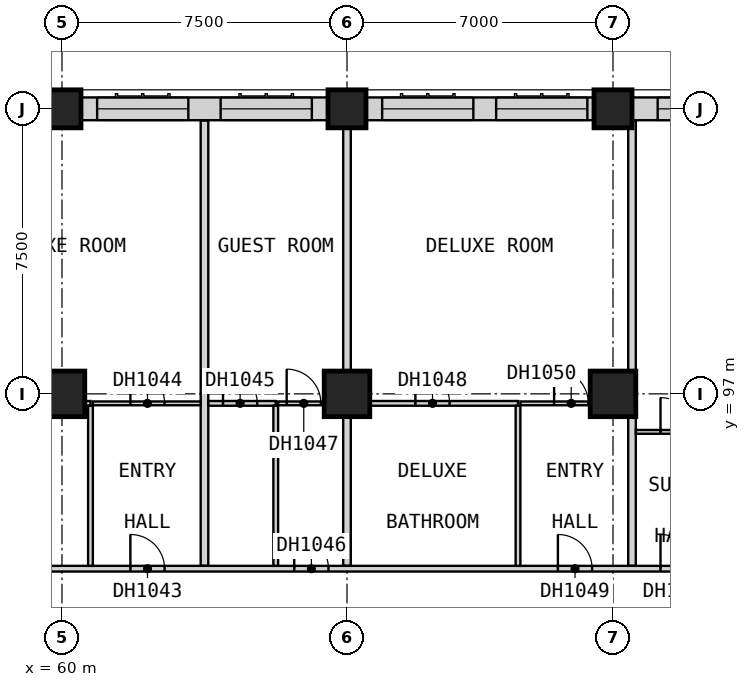
"""IFC4 building model, lengths in metres.
Left out: names, types, materials, properties, quantities, classifications, styles, units other than length and angle.
Written with IfcOpenShell. Run it as: python <this file> out.ifc"""

import sys

from ifc_helpers import new_model, si_unit, direction, frame, frame_2d, origin, origin_2d, place, context, subcontext, project, spatial, rectangle, extrude, element, fill, save


model = new_model("IFC4")
c1 = context("Model", 3, precision=1e-05, world=origin(), true_north=direction((0.0, 1.0)))
c2 = subcontext(c1, "Body", "Model", "MODEL_VIEW")
j1 = project(units=[si_unit("LENGTHUNIT", "METRE"), si_unit("PLANEANGLEUNIT", "RADIAN")], contexts=[c1])
p1 = place(None, origin())
s1 = spatial("IfcSite", under=j1, at=p1, CompositionType="ELEMENT")
p2 = place(p1, origin())
s2 = spatial("IfcBuilding", under=s1, at=p2, CompositionType="ELEMENT")
p3 = place(p2, frame((0.0, 0.0, 48.4)))
s3 = spatial("IfcBuildingStorey", under=s2, at=p3, CompositionType="ELEMENT", Elevation=48.4)
p4 = place(p3, frame((60.0, 97.0, 0.0), z_axis=(0.0, 0.0, 1.0), x_axis=(1.0, 0.0, 0.0)))
e1 = element("IfcColumn", 1, at=p4, inside=s3, PredefinedType="COLUMN", context=c2, shape_type="SweptSolid", body=[
    extrude(rectangle(XDim=1.2, YDim=1.2, at=origin_2d()), origin(), (0.0, 0.0, 1.0), 3.6),
])
p5 = place(p3, frame((60.0, 104.5, 0.0), z_axis=(0.0, 0.0, 1.0), x_axis=(1.0, 0.0, 0.0)))
e2 = element("IfcColumn", 2, at=p5, inside=s3, PredefinedType="COLUMN", context=c2, shape_type="SweptSolid", body=[
    extrude(rectangle(XDim=1.0, YDim=1.0, at=origin_2d()), origin(), (0.0, 0.0, 1.0), 3.6),
])
p6 = place(p3, frame((67.5, 97.0, 0.0), z_axis=(0.0, 0.0, 1.0), x_axis=(1.0, 0.0, 0.0)))
e3 = element("IfcColumn", 3, at=p6, inside=s3, PredefinedType="COLUMN", context=c2, shape_type="SweptSolid", body=[
    extrude(rectangle(XDim=1.2, YDim=1.2, at=origin_2d()), origin(), (0.0, 0.0, 1.0), 3.6),
])
p7 = place(p3, frame((67.5, 104.5, 0.0), z_axis=(0.0, 0.0, 1.0), x_axis=(1.0, 0.0, 0.0)))
e4 = element("IfcColumn", 4, at=p7, inside=s3, PredefinedType="COLUMN", context=c2, shape_type="SweptSolid", body=[
    extrude(rectangle(XDim=1.0, YDim=1.0, at=origin_2d()), origin(), (0.0, 0.0, 1.0), 3.6),
])
p8 = place(p3, frame((74.5, 97.0, 0.0), z_axis=(0.0, 0.0, 1.0), x_axis=(1.0, 0.0, 0.0)))
e5 = element("IfcColumn", 5, at=p8, inside=s3, PredefinedType="COLUMN", context=c2, shape_type="SweptSolid", body=[
    extrude(rectangle(XDim=1.2, YDim=1.2, at=origin_2d()), origin(), (0.0, 0.0, 1.0), 3.6),
])
p9 = place(p3, frame((74.5, 104.5, 0.0), z_axis=(0.0, 0.0, 1.0), x_axis=(1.0, 0.0, 0.0)))
e6 = element("IfcColumn", 6, at=p9, inside=s3, PredefinedType="COLUMN", context=c2, shape_type="SweptSolid", body=[
    extrude(rectangle(XDim=1.0, YDim=1.0, at=origin_2d()), origin(), (0.0, 0.0, 1.0), 3.6),
])
p10 = place(p3, frame((81.5, 104.5, 0.0), z_axis=(0.0, 0.0, 1.0), x_axis=(-1.0, 0.0, 0.0)))
e7 = element("IfcWall", 7, at=p10, inside=s3, PredefinedType="SOLIDWALL", context=c2, shape_type="SweptSolid", body=[
    extrude(rectangle(XDim=6.5, YDim=0.6, at=frame_2d((3.25, 0.0))), origin(), (0.0, 0.0, 1.0), 2.85),
])
p11 = place(p10, frame((3.425, 0.0, 0.8)))
e8 = element("IfcOpeningElement", 8, at=p11, cuts=e7, PredefinedType="OPENING", context=c2, shape_type="SweptSolid", body=[
    extrude(rectangle(XDim=2.4, YDim=1.8, at=frame_2d((1.2, 0.9))), frame((0.0, 0.31, 0.0), z_axis=(0.0, -1.0, 0.0), x_axis=(1.0, 0.0, 0.0)), (0.0, 0.0, 1.0), 0.62),
])
p12 = place(p10, frame((0.175, 0.0, 0.8)))
e9 = element("IfcOpeningElement", 9, at=p12, cuts=e7, PredefinedType="OPENING", context=c2, shape_type="SweptSolid", body=[
    extrude(rectangle(XDim=2.4, YDim=1.8, at=frame_2d((1.2, 0.9))), frame((0.0, 0.31, 0.0), z_axis=(0.0, -1.0, 0.0), x_axis=(1.0, 0.0, 0.0)), (0.0, 0.0, 1.0), 0.62),
])
p13 = place(p3, frame((74.0, 104.5, 0.0), z_axis=(0.0, 0.0, 1.0), x_axis=(-1.0, 0.0, 0.0)))
e10 = element("IfcWall", 10, at=p13, inside=s3, PredefinedType="SOLIDWALL", context=c2, shape_type="SweptSolid", body=[
    extrude(rectangle(XDim=6.0, YDim=0.6, at=frame_2d((3.0, 0.0))), origin(), (0.0, 0.0, 1.0), 2.85),
])
p14 = place(p13, frame((3.175, 0.0, 0.8)))
e11 = element("IfcOpeningElement", 11, at=p14, cuts=e10, PredefinedType="OPENING", context=c2, shape_type="SweptSolid", body=[
    extrude(rectangle(XDim=2.4, YDim=1.8, at=frame_2d((1.2, 0.9))), frame((0.0, 0.31, 0.0), z_axis=(0.0, -1.0, 0.0), x_axis=(1.0, 0.0, 0.0)), (0.0, 0.0, 1.0), 0.62),
])
p15 = place(p13, frame((0.175, 0.0, 0.8)))
e12 = element("IfcOpeningElement", 12, at=p15, cuts=e10, PredefinedType="OPENING", context=c2, shape_type="SweptSolid", body=[
    extrude(rectangle(XDim=2.4, YDim=1.8, at=frame_2d((1.2, 0.9))), frame((0.0, 0.31, 0.0), z_axis=(0.0, -1.0, 0.0), x_axis=(1.0, 0.0, 0.0)), (0.0, 0.0, 1.0), 0.62),
])
p16 = place(p3, frame((67.0, 104.5, 0.0), z_axis=(0.0, 0.0, 1.0), x_axis=(-1.0, 0.0, 0.0)))
e13 = element("IfcWall", 13, at=p16, inside=s3, PredefinedType="SOLIDWALL", context=c2, shape_type="SweptSolid", body=[
    extrude(rectangle(XDim=6.5, YDim=0.6, at=frame_2d((3.25, 0.0))), origin(), (0.0, 0.0, 1.0), 2.85),
])
p17 = place(p16, frame((3.675, 0.0, 0.8)))
e14 = element("IfcOpeningElement", 14, at=p17, cuts=e13, PredefinedType="OPENING", context=c2, shape_type="SweptSolid", body=[
    extrude(rectangle(XDim=2.4, YDim=1.8, at=frame_2d((1.2, 0.9))), frame((0.0, 0.31, 0.0), z_axis=(0.0, -1.0, 0.0), x_axis=(1.0, 0.0, 0.0)), (0.0, 0.0, 1.0), 0.62),
])
p18 = place(p16, frame((0.425, 0.0, 0.8)))
e15 = element("IfcOpeningElement", 15, at=p18, cuts=e13, PredefinedType="OPENING", context=c2, shape_type="SweptSolid", body=[
    extrude(rectangle(XDim=2.4, YDim=1.8, at=frame_2d((1.2, 0.9))), frame((0.0, 0.31, 0.0), z_axis=(0.0, -1.0, 0.0), x_axis=(1.0, 0.0, 0.0)), (0.0, 0.0, 1.0), 0.62),
])
p19 = place(p3, frame((63.75, 92.475, 0.0), z_axis=(0.0, 0.0, 1.0), x_axis=(0.0, 1.0, 0.0)))
e16 = element("IfcWall", 16, at=p19, inside=s3, PredefinedType="PARTITIONING", context=c2, shape_type="SweptSolid", body=[
    extrude(rectangle(XDim=11.715, YDim=0.2, at=frame_2d((5.857, 0.0))), origin(), (0.0, 0.0, 1.0), 3.35),
])
p20 = place(p3, frame((67.5, 92.475, 0.0), z_axis=(0.0, 0.0, 1.0), x_axis=(0.0, 1.0, 0.0)))
e17 = element("IfcWall", 17, at=p20, inside=s3, PredefinedType="PARTITIONING", context=c2, shape_type="SweptSolid", body=[
    extrude(rectangle(XDim=12.525, YDim=0.2, at=frame_2d((6.262, 0.0))), origin(), (0.0, 0.0, 1.0), 3.35),
])
p21 = place(p3, frame((75.0, 92.475, 0.0), z_axis=(0.0, 0.0, 1.0), x_axis=(0.0, 1.0, 0.0)))
e18 = element("IfcWall", 18, at=p21, inside=s3, PredefinedType="PARTITIONING", context=c2, shape_type="SweptSolid", body=[
    extrude(rectangle(XDim=11.715, YDim=0.2, at=frame_2d((5.857, 0.0))), origin(), (0.0, 0.0, 1.0), 3.35),
])
p22 = place(p3, frame((33.75, 92.4, 0.0), z_axis=(0.0, 0.0, 1.0), x_axis=(1.0, 0.0, 0.0)))
e19 = element("IfcWall", 19, at=p22, inside=s3, PredefinedType="PARTITIONING", context=c2, shape_type="SweptSolid", body=[
    extrude(rectangle(XDim=43.65, YDim=0.15, at=frame_2d((21.825, 0.0))), origin(), (0.0, 0.0, 1.0), 3.35),
])
p23 = place(p22, frame((5.175, 0.0, 0.0)))
e20 = element("IfcOpeningElement", 20, at=p23, cuts=e19, PredefinedType="OPENING", context=c2, shape_type="SweptSolid", body=[
    extrude(rectangle(XDim=0.9, YDim=2.1, at=frame_2d((0.45, 1.05))), frame((0.0, 0.085, 0.0), z_axis=(0.0, -1.0, 0.0), x_axis=(1.0, 0.0, 0.0)), (0.0, 0.0, 1.0), 0.17),
])
p24 = place(p22, frame((9.863, 0.0, 0.0)))
e21 = element("IfcOpeningElement", 21, at=p24, cuts=e19, PredefinedType="OPENING", context=c2, shape_type="SweptSolid", body=[
    extrude(rectangle(XDim=0.9, YDim=2.1, at=frame_2d((0.45, 1.05))), frame((0.0, 0.085, 0.0), z_axis=(0.0, -1.0, 0.0), x_axis=(1.0, 0.0, 0.0)), (0.0, 0.0, 1.0), 0.17),
])
p25 = place(p22, frame((13.613, 0.0, 0.0)))
e22 = element("IfcOpeningElement", 22, at=p25, cuts=e19, PredefinedType="OPENING", context=c2, shape_type="SweptSolid", body=[
    extrude(rectangle(XDim=0.9, YDim=2.1, at=frame_2d((0.45, 1.05))), frame((0.0, 0.085, 0.0), z_axis=(0.0, -1.0, 0.0), x_axis=(1.0, 0.0, 0.0)), (0.0, 0.0, 1.0), 0.17),
])
p26 = place(p22, frame((17.363, 0.0, 0.0)))
e23 = element("IfcOpeningElement", 23, at=p26, cuts=e19, PredefinedType="OPENING", context=c2, shape_type="SweptSolid", body=[
    extrude(rectangle(XDim=0.9, YDim=2.1, at=frame_2d((0.45, 1.05))), frame((0.0, 0.085, 0.0), z_axis=(0.0, -1.0, 0.0), x_axis=(1.0, 0.0, 0.0)), (0.0, 0.0, 1.0), 0.17),
])
p27 = place(p22, frame((21.113, 0.0, 0.0)))
e24 = element("IfcOpeningElement", 24, at=p27, cuts=e19, PredefinedType="OPENING", context=c2, shape_type="SweptSolid", body=[
    extrude(rectangle(XDim=0.9, YDim=2.1, at=frame_2d((0.45, 1.05))), frame((0.0, 0.085, 0.0), z_axis=(0.0, -1.0, 0.0), x_axis=(1.0, 0.0, 0.0)), (0.0, 0.0, 1.0), 0.17),
])
p28 = place(p22, frame((28.05, 0.0, 0.0)))
e25 = element("IfcOpeningElement", 25, at=p28, cuts=e19, PredefinedType="OPENING", context=c2, shape_type="SweptSolid", body=[
    extrude(rectangle(XDim=0.9, YDim=2.1, at=frame_2d((0.45, 1.05))), frame((0.0, 0.085, 0.0), z_axis=(0.0, -1.0, 0.0), x_axis=(1.0, 0.0, 0.0)), (0.0, 0.0, 1.0), 0.17),
])
p29 = place(p22, frame((32.363, 0.0, 0.0)))
e26 = element("IfcOpeningElement", 26, at=p29, cuts=e19, PredefinedType="OPENING", context=c2, shape_type="SweptSolid", body=[
    extrude(rectangle(XDim=0.9, YDim=2.1, at=frame_2d((0.45, 1.05))), frame((0.0, 0.085, 0.0), z_axis=(0.0, -1.0, 0.0), x_axis=(1.0, 0.0, 0.0)), (0.0, 0.0, 1.0), 0.17),
])
p30 = place(p22, frame((39.3, 0.0, 0.0)))
e27 = element("IfcOpeningElement", 27, at=p30, cuts=e19, PredefinedType="OPENING", context=c2, shape_type="SweptSolid", body=[
    extrude(rectangle(XDim=0.9, YDim=2.1, at=frame_2d((0.45, 1.05))), frame((0.0, 0.085, 0.0), z_axis=(0.0, -1.0, 0.0), x_axis=(1.0, 0.0, 0.0)), (0.0, 0.0, 1.0), 0.17),
])
p31 = place(p22, frame((42.0, 0.0, 0.0)))
e28 = element("IfcOpeningElement", 28, at=p31, cuts=e19, PredefinedType="OPENING", context=c2, shape_type="SweptSolid", body=[
    extrude(rectangle(XDim=0.9, YDim=2.1, at=frame_2d((0.45, 1.05))), frame((0.0, 0.085, 0.0), z_axis=(0.0, -1.0, 0.0), x_axis=(1.0, 0.0, 0.0)), (0.0, 0.0, 1.0), 0.17),
])
p32 = place(p3, frame((75.1, 96.0, 0.0), z_axis=(0.0, 0.0, 1.0), x_axis=(1.0, 0.0, 0.0)))
e29 = element("IfcWall", 29, at=p32, inside=s3, PredefinedType="PARTITIONING", context=c2, shape_type="SweptSolid", body=[
    extrude(rectangle(XDim=7.35, YDim=0.1, at=frame_2d((3.675, 0.0))), origin(), (0.0, 0.0, 1.0), 3.35),
])
p33 = place(p32, frame((0.65, 0.0, 0.0)))
e30 = element("IfcOpeningElement", 30, at=p33, cuts=e29, PredefinedType="OPENING", context=c2, shape_type="SweptSolid", body=[
    extrude(rectangle(XDim=0.9, YDim=2.1, at=frame_2d((0.45, 1.05))), frame((0.0, 0.06, 0.0), z_axis=(0.0, -1.0, 0.0), x_axis=(1.0, 0.0, 0.0)), (0.0, 0.0, 1.0), 0.12),
])
p34 = place(p3, frame((60.812, 96.75, 0.0), z_axis=(0.0, 0.0, 1.0), x_axis=(1.0, 0.0, 0.0)))
e31 = element("IfcWall", 31, at=p34, inside=s3, PredefinedType="PARTITIONING", context=c2, shape_type="SweptSolid", body=[
    extrude(rectangle(XDim=2.837, YDim=0.1, at=frame_2d((1.419, 0.0))), origin(), (0.0, 0.0, 1.0), 3.35),
])
p35 = place(p34, frame((0.988, 0.0, 0.0)))
e32 = element("IfcOpeningElement", 32, at=p35, cuts=e31, PredefinedType="OPENING", context=c2, shape_type="SweptSolid", body=[
    extrude(rectangle(XDim=0.9, YDim=2.1, at=frame_2d((0.45, 1.05))), frame((0.0, 0.06, 0.0), z_axis=(0.0, -1.0, 0.0), x_axis=(1.0, 0.0, 0.0)), (0.0, 0.0, 1.0), 0.12),
])
p36 = place(p3, frame((65.688, 96.75, 0.0), z_axis=(0.0, 0.0, 1.0), x_axis=(1.0, 0.0, 0.0)))
e33 = element("IfcWall", 33, at=p36, inside=s3, PredefinedType="PARTITIONING", context=c2, shape_type="SweptSolid", body=[
    extrude(rectangle(XDim=1.712, YDim=0.1, at=frame_2d((0.856, 0.0))), origin(), (0.0, 0.0, 1.0), 3.35),
])
p37 = place(p36, frame((0.225, 0.0, 0.0)))
e34 = element("IfcOpeningElement", 34, at=p37, cuts=e33, PredefinedType="OPENING", context=c2, shape_type="SweptSolid", body=[
    extrude(rectangle(XDim=0.9, YDim=2.1, at=frame_2d((0.45, 1.05))), frame((0.0, 0.06, 0.0), z_axis=(0.0, -1.0, 0.0), x_axis=(1.0, 0.0, 0.0)), (0.0, 0.0, 1.0), 0.12),
])
p38 = place(p3, frame((72.062, 96.75, 0.0), z_axis=(0.0, 0.0, 1.0), x_axis=(1.0, 0.0, 0.0)))
e35 = element("IfcWall", 35, at=p38, inside=s3, PredefinedType="PARTITIONING", context=c2, shape_type="SweptSolid", body=[
    extrude(rectangle(XDim=2.837, YDim=0.1, at=frame_2d((1.419, 0.0))), origin(), (0.0, 0.0, 1.0), 3.35),
])
p39 = place(p38, frame((0.887, 0.0, 0.0)))
e36 = element("IfcOpeningElement", 36, at=p39, cuts=e35, PredefinedType="OPENING", context=c2, shape_type="SweptSolid", body=[
    extrude(rectangle(XDim=0.9, YDim=2.1, at=frame_2d((0.45, 1.05))), frame((0.0, 0.06, 0.0), z_axis=(0.0, -1.0, 0.0), x_axis=(1.0, 0.0, 0.0)), (0.0, 0.0, 1.0), 0.12),
])
p40 = place(p3, frame((56.35, 96.75, 0.0), z_axis=(0.0, 0.0, 1.0), x_axis=(1.0, 0.0, 0.0)))
e37 = element("IfcWall", 37, at=p40, inside=s3, PredefinedType="PARTITIONING", context=c2, shape_type="SweptSolid", body=[
    extrude(rectangle(XDim=4.4, YDim=0.125, at=frame_2d((2.2, 0.0))), origin(), (0.0, 0.0, 1.0), 3.35),
])
p41 = place(p40, frame((1.7, 0.0, 0.0)))
e38 = element("IfcOpeningElement", 38, at=p41, cuts=e37, PredefinedType="OPENING", context=c2, shape_type="SweptSolid", body=[
    extrude(rectangle(XDim=0.9, YDim=2.1, at=frame_2d((0.45, 1.05))), frame((0.0, 0.073, 0.0), z_axis=(0.0, -1.0, 0.0), x_axis=(1.0, 0.0, 0.0)), (0.0, 0.0, 1.0), 0.145),
])
p42 = place(p3, frame((63.85, 96.75, 0.0), z_axis=(0.0, 0.0, 1.0), x_axis=(1.0, 0.0, 0.0)))
e39 = element("IfcWall", 39, at=p42, inside=s3, PredefinedType="PARTITIONING", context=c2, shape_type="SweptSolid", body=[
    extrude(rectangle(XDim=1.775, YDim=0.125, at=frame_2d((0.887, 0.0))), origin(), (0.0, 0.0, 1.0), 3.35),
])
p43 = place(p42, frame((0.387, 0.0, 0.0)))
e40 = element("IfcOpeningElement", 40, at=p43, cuts=e39, PredefinedType="OPENING", context=c2, shape_type="SweptSolid", body=[
    extrude(rectangle(XDim=0.9, YDim=2.1, at=frame_2d((0.45, 1.05))), frame((0.0, 0.073, 0.0), z_axis=(0.0, -1.0, 0.0), x_axis=(1.0, 0.0, 0.0)), (0.0, 0.0, 1.0), 0.145),
])
p44 = place(p3, frame((67.6, 96.75, 0.0), z_axis=(0.0, 0.0, 1.0), x_axis=(1.0, 0.0, 0.0)))
e41 = element("IfcWall", 41, at=p44, inside=s3, PredefinedType="PARTITIONING", context=c2, shape_type="SweptSolid", body=[
    extrude(rectangle(XDim=4.4, YDim=0.125, at=frame_2d((2.2, 0.0))), origin(), (0.0, 0.0, 1.0), 3.35),
])
p45 = place(p44, frame((1.7, 0.0, 0.0)))
e42 = element("IfcOpeningElement", 42, at=p45, cuts=e41, PredefinedType="OPENING", context=c2, shape_type="SweptSolid", body=[
    extrude(rectangle(XDim=0.9, YDim=2.1, at=frame_2d((0.45, 1.05))), frame((0.0, 0.073, 0.0), z_axis=(0.0, -1.0, 0.0), x_axis=(1.0, 0.0, 0.0)), (0.0, 0.0, 1.0), 0.145),
])
for number, where, z_axis, x_axis in (
    (43, (60.75, 92.475, 0.0), (0.0, 0.0, 1.0), (0.0, 1.0, 0.0)),
    (44, (65.625, 92.475, 0.0), (0.0, 0.0, 1.0), (0.0, 1.0, 0.0)),
    (45, (72.0, 92.475, 0.0), (0.0, 0.0, 1.0), (0.0, 1.0, 0.0)),
):
    element("IfcWall", number, at=place(p3, frame(where, z_axis=z_axis, x_axis=x_axis)), inside=s3, PredefinedType="PARTITIONING", context=c2, shape_type="SweptSolid", body=[
        extrude(rectangle(XDim=4.212, YDim=0.125, at=frame_2d((2.106, 0.0))), origin(), (0.0, 0.0, 1.0), 3.35),
    ])
p46 = place(p11, origin())
e46 = element("IfcWindow", 46, at=p46, inside=s3, PartitioningType="SINGLE_PANEL", PredefinedType="WINDOW", context=c2, shape_type="SweptSolid", body=[
    extrude(rectangle(XDim=2.4, YDim=1.8, at=frame_2d((1.2, 0.9))), frame((0.0, -0.07, 0.0), z_axis=(0.0, -1.0, 0.0), x_axis=(1.0, 0.0, 0.0)), (0.0, 0.0, 1.0), 0.06),
])
fill(e8, e46)
p47 = place(p14, origin())
e47 = element("IfcWindow", 47, at=p47, inside=s3, PartitioningType="SINGLE_PANEL", PredefinedType="WINDOW", context=c2, shape_type="SweptSolid", body=[
    extrude(rectangle(XDim=2.4, YDim=1.8, at=frame_2d((1.2, 0.9))), frame((0.0, -0.07, 0.0), z_axis=(0.0, -1.0, 0.0), x_axis=(1.0, 0.0, 0.0)), (0.0, 0.0, 1.0), 0.06),
])
fill(e11, e47)
p48 = place(p15, origin())
e48 = element("IfcWindow", 48, at=p48, inside=s3, PartitioningType="SINGLE_PANEL", PredefinedType="WINDOW", context=c2, shape_type="SweptSolid", body=[
    extrude(rectangle(XDim=2.4, YDim=1.8, at=frame_2d((1.2, 0.9))), frame((0.0, -0.07, 0.0), z_axis=(0.0, -1.0, 0.0), x_axis=(1.0, 0.0, 0.0)), (0.0, 0.0, 1.0), 0.06),
])
fill(e12, e48)
p49 = place(p17, origin())
e49 = element("IfcWindow", 49, at=p49, inside=s3, PartitioningType="SINGLE_PANEL", PredefinedType="WINDOW", context=c2, shape_type="SweptSolid", body=[
    extrude(rectangle(XDim=2.4, YDim=1.8, at=frame_2d((1.2, 0.9))), frame((0.0, -0.07, 0.0), z_axis=(0.0, -1.0, 0.0), x_axis=(1.0, 0.0, 0.0)), (0.0, 0.0, 1.0), 0.06),
])
fill(e14, e49)
p50 = place(p18, origin())
e50 = element("IfcWindow", 50, at=p50, inside=s3, PartitioningType="SINGLE_PANEL", PredefinedType="WINDOW", context=c2, shape_type="SweptSolid", body=[
    extrude(rectangle(XDim=2.4, YDim=1.8, at=frame_2d((1.2, 0.9))), frame((0.0, -0.07, 0.0), z_axis=(0.0, -1.0, 0.0), x_axis=(1.0, 0.0, 0.0)), (0.0, 0.0, 1.0), 0.06),
])
fill(e15, e50)
p51 = place(p28, origin())
e51 = element("IfcDoor", 51, at=p51, inside=s3, OperationType="SINGLE_SWING_LEFT", PredefinedType="DOOR", context=c2, shape_type="SweptSolid", body=[
    extrude(rectangle(XDim=0.9, YDim=2.1, at=frame_2d((0.45, 1.05))), frame((0.0, 0.025, 0.0), z_axis=(0.0, -1.0, 0.0), x_axis=(1.0, 0.0, 0.0)), (0.0, 0.0, 1.0), 0.05),
])
fill(e25, e51)
p52 = place(p35, origin())
e52 = element("IfcDoor", 52, at=p52, inside=s3, OperationType="SINGLE_SWING_RIGHT", PredefinedType="DOOR", context=c2, shape_type="SweptSolid", body=[
    extrude(rectangle(XDim=0.9, YDim=2.1, at=frame_2d((0.45, 1.05))), frame((0.0, 0.025, 0.0), z_axis=(0.0, -1.0, 0.0), x_axis=(1.0, 0.0, 0.0)), (0.0, 0.0, 1.0), 0.05),
])
fill(e32, e52)
p53 = place(p43, origin())
e53 = element("IfcDoor", 53, at=p53, inside=s3, OperationType="SINGLE_SWING_RIGHT", PredefinedType="DOOR", context=c2, shape_type="SweptSolid", body=[
    extrude(rectangle(XDim=0.9, YDim=2.1, at=frame_2d((0.45, 1.05))), frame((0.0, 0.025, 0.0), z_axis=(0.0, -1.0, 0.0), x_axis=(1.0, 0.0, 0.0)), (0.0, 0.0, 1.0), 0.05),
])
fill(e40, e53)
p54 = place(p29, origin())
e54 = element("IfcDoor", 54, at=p54, inside=s3, OperationType="SINGLE_SWING_LEFT", PredefinedType="DOOR", context=c2, shape_type="SweptSolid", body=[
    extrude(rectangle(XDim=0.9, YDim=2.1, at=frame_2d((0.45, 1.05))), frame((0.0, 0.025, 0.0), z_axis=(0.0, -1.0, 0.0), x_axis=(1.0, 0.0, 0.0)), (0.0, 0.0, 1.0), 0.05),
])
fill(e26, e54)
p55 = place(p37, origin())
e55 = element("IfcDoor", 55, at=p55, inside=s3, OperationType="SINGLE_SWING_RIGHT", PredefinedType="DOOR", context=c2, shape_type="SweptSolid", body=[
    extrude(rectangle(XDim=0.9, YDim=2.1, at=frame_2d((0.45, 1.05))), frame((0.0, 0.025, 0.0), z_axis=(0.0, -1.0, 0.0), x_axis=(1.0, 0.0, 0.0)), (0.0, 0.0, 1.0), 0.05),
])
fill(e34, e55)
p56 = place(p45, origin())
e56 = element("IfcDoor", 56, at=p56, inside=s3, OperationType="SINGLE_SWING_RIGHT", PredefinedType="DOOR", context=c2, shape_type="SweptSolid", body=[
    extrude(rectangle(XDim=0.9, YDim=2.1, at=frame_2d((0.45, 1.05))), frame((0.0, 0.025, 0.0), z_axis=(0.0, -1.0, 0.0), x_axis=(1.0, 0.0, 0.0)), (0.0, 0.0, 1.0), 0.05),
])
fill(e42, e56)
p57 = place(p30, origin())
e57 = element("IfcDoor", 57, at=p57, inside=s3, OperationType="SINGLE_SWING_LEFT", PredefinedType="DOOR", context=c2, shape_type="SweptSolid", body=[
    extrude(rectangle(XDim=0.9, YDim=2.1, at=frame_2d((0.45, 1.05))), frame((0.0, 0.025, 0.0), z_axis=(0.0, -1.0, 0.0), x_axis=(1.0, 0.0, 0.0)), (0.0, 0.0, 1.0), 0.05),
])
fill(e27, e57)
p58 = place(p39, origin())
e58 = element("IfcDoor", 58, at=p58, inside=s3, OperationType="SINGLE_SWING_RIGHT", PredefinedType="DOOR", context=c2, shape_type="SweptSolid", body=[
    extrude(rectangle(XDim=0.9, YDim=2.1, at=frame_2d((0.45, 1.05))), frame((0.0, 0.025, 0.0), z_axis=(0.0, -1.0, 0.0), x_axis=(1.0, 0.0, 0.0)), (0.0, 0.0, 1.0), 0.05),
])
fill(e36, e58)
p59 = place(p31, origin())
e59 = element("IfcDoor", 59, at=p59, inside=s3, OperationType="SINGLE_SWING_RIGHT", PredefinedType="DOOR", context=c2, shape_type="SweptSolid", body=[
    extrude(rectangle(XDim=0.9, YDim=2.1, at=frame_2d((0.45, 1.05))), frame((0.0, 0.025, 0.0), z_axis=(0.0, -1.0, 0.0), x_axis=(1.0, 0.0, 0.0)), (0.0, 0.0, 1.0), 0.05),
])
fill(e28, e59)
p60 = place(p33, origin())
e60 = element("IfcDoor", 60, at=p60, inside=s3, OperationType="SINGLE_SWING_LEFT", PredefinedType="DOOR", context=c2, shape_type="SweptSolid", body=[
    extrude(rectangle(XDim=0.9, YDim=2.1, at=frame_2d((0.45, 1.05))), frame((0.0, 0.025, 0.0), z_axis=(0.0, -1.0, 0.0), x_axis=(1.0, 0.0, 0.0)), (0.0, 0.0, 1.0), 0.05),
])
fill(e30, e60)
save(model, sys.argv[1])
